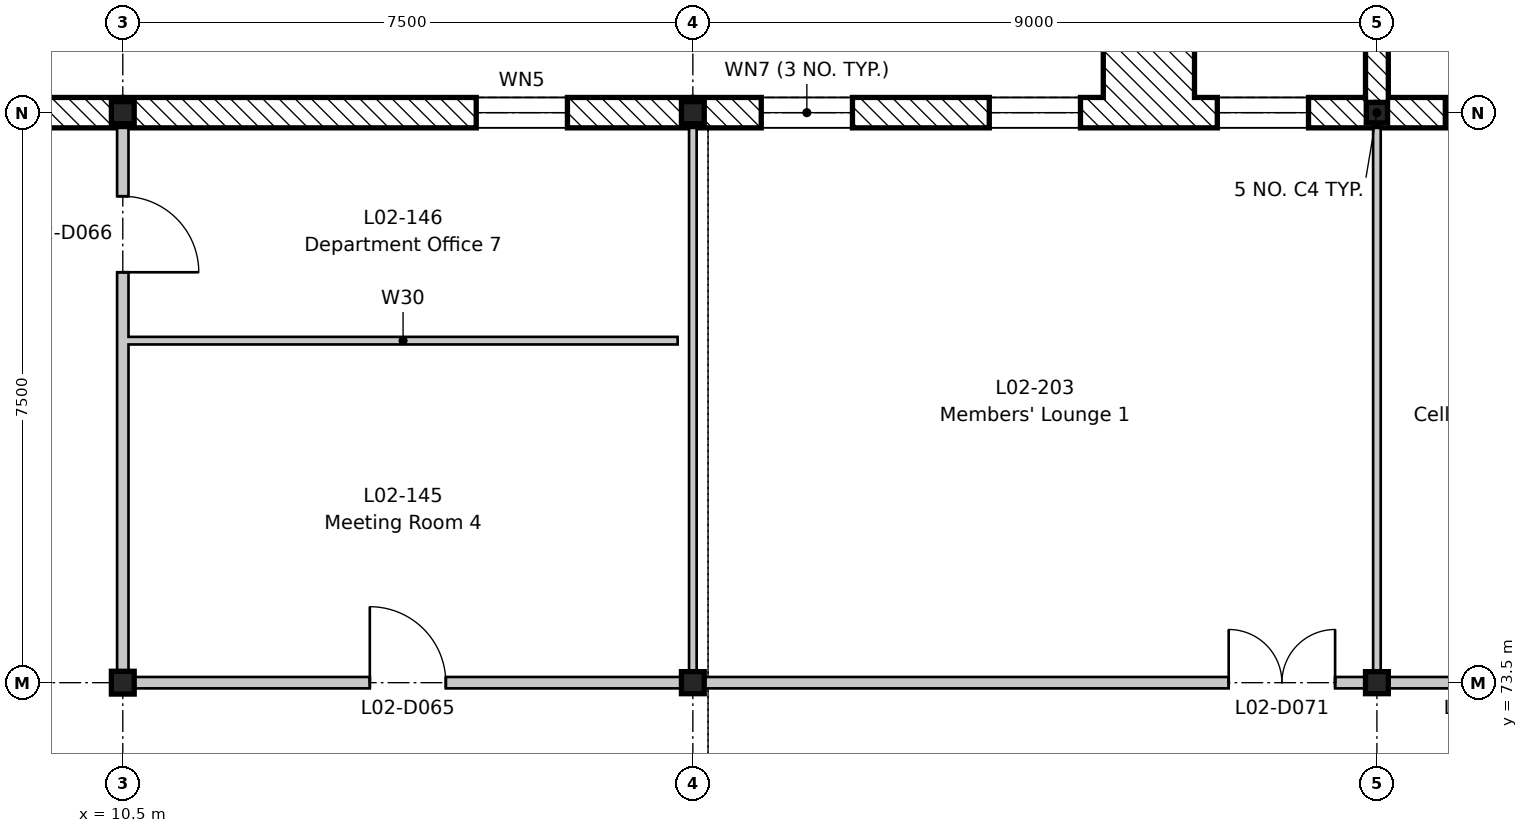
"""IFC4 building model, lengths in metres.
Left out: names, types, materials, properties, quantities, classifications, styles, units other than length and angle.
Written with IfcOpenShell. Run it as: python <this file> out.ifc"""

import sys

from ifc_helpers import new_model, si_unit, direction, frame, frame_2d, origin, origin_2d, place, context, subcontext, project, spatial, rectangle, i_section, extrude, element, fill, save


model = new_model("IFC4")
c1 = context("Model", 3, precision=1e-05, world=origin(), true_north=direction((0.0, 1.0)))
c2 = subcontext(c1, "Body", "Model", "MODEL_VIEW")
j1 = project(units=[si_unit("LENGTHUNIT", "METRE"), si_unit("PLANEANGLEUNIT", "RADIAN")], contexts=[c1])
p1 = place(None, origin())
s1 = spatial("IfcSite", under=j1, at=p1, CompositionType="ELEMENT")
p2 = place(p1, origin())
s2 = spatial("IfcBuilding", under=s1, at=p2, CompositionType="ELEMENT")
p3 = place(p2, frame((0.0, 0.0, 9.9)))
s3 = spatial("IfcBuildingStorey", under=s2, at=p3, CompositionType="ELEMENT", Elevation=9.9)
p4 = place(p3, frame((10.5, 73.5, -0.2), z_axis=(0.0, 0.0, 1.0), x_axis=(1.0, 0.0, 0.0)))
e1 = element("IfcColumn", 1, at=p4, inside=s3, PredefinedType="COLUMN", context=c2, shape_type="SweptSolid", body=[
    extrude(i_section(OverallWidth=0.3, OverallDepth=0.3, WebThickness=0.011, FlangeThickness=0.019, FilletRadius=0.027, at=origin_2d()), origin(), (0.0, 0.0, 1.0), 4.5),
])
for number, where, z_axis, x_axis in (
    (2, (10.5, 81.0, -0.2), (0.0, 0.0, 1.0), (1.0, 0.0, 0.0)),
    (3, (18.0, 73.5, -0.2), (0.0, 0.0, 1.0), (1.0, 0.0, 0.0)),
    (4, (18.0, 81.0, -0.2), (0.0, 0.0, 1.0), (1.0, 0.0, 0.0)),
    (5, (27.0, 73.5, -0.2), (0.0, 0.0, 1.0), (1.0, 0.0, 0.0)),
):
    element("IfcColumn", number, at=place(p3, frame(where, z_axis=z_axis, x_axis=x_axis)), inside=s3, PredefinedType="COLUMN", context=c2, shape_type="SweptSolid", body=[
        extrude(i_section(OverallWidth=0.3, OverallDepth=0.29, WebThickness=0.009, FlangeThickness=0.014, FilletRadius=0.027, at=origin_2d()), origin(), (0.0, 0.0, 1.0), 4.5),
    ])
p5 = place(p3, frame((27.0, 81.0, -0.2), z_axis=(0.0, 0.0, 1.0), x_axis=(1.0, 0.0, 0.0)))
e6 = element("IfcColumn", 6, at=p5, inside=s3, PredefinedType="COLUMN", context=c2, shape_type="SweptSolid", body=[
    extrude(i_section(OverallWidth=0.28, OverallDepth=0.27, WebThickness=0.008, FlangeThickness=0.013, FilletRadius=0.024, at=origin_2d()), origin(), (0.0, 0.0, 1.0), 4.5),
])
p6 = place(p3, frame((7.509, 81.0, 0.0), z_axis=(0.0, 0.0, 1.0), x_axis=(1.0, 0.0, 0.0)))
e7 = element("IfcWall", 7, at=p6, inside=s3, PredefinedType="STANDARD", context=c2, shape_type="SweptSolid", body=[
    extrude(rectangle(XDim=2.981, YDim=0.4, at=frame_2d((1.491, 0.0))), origin(), (0.0, 0.0, 1.0), 4.1),
])
p7 = place(p3, frame((10.509, 81.0, 0.0), z_axis=(0.0, 0.0, 1.0), x_axis=(1.0, 0.0, 0.0)))
e8 = element("IfcWall", 8, at=p7, inside=s3, PredefinedType="STANDARD", context=c2, shape_type="SweptSolid", body=[
    extrude(rectangle(XDim=7.481, YDim=0.4, at=frame_2d((3.741, 0.0))), origin(), (0.0, 0.0, 1.0), 3.97),
])
p8 = place(p7, frame((4.641, 0.0, 0.6)))
e9 = element("IfcOpeningElement", 9, at=p8, cuts=e8, PredefinedType="OPENING", context=c2, shape_type="SweptSolid", body=[
    extrude(rectangle(XDim=1.2, YDim=3.0, at=frame_2d((0.6, 1.5))), frame((0.0, 0.21, 0.0), z_axis=(0.0, -1.0, 0.0), x_axis=(1.0, 0.0, 0.0)), (0.0, 0.0, 1.0), 0.42),
])
p9 = place(p3, frame((18.009, 81.0, 0.0), z_axis=(0.0, 0.0, 1.0), x_axis=(1.0, 0.0, 0.0)))
e10 = element("IfcWall", 10, at=p9, inside=s3, PredefinedType="STANDARD", context=c2, shape_type="SweptSolid", body=[
    extrude(rectangle(XDim=8.982, YDim=0.4, at=frame_2d((4.491, 0.0))), origin(), (0.0, 0.0, 1.0), 3.9),
])
p10 = place(p9, frame((0.891, 0.0, 0.9)))
e11 = element("IfcOpeningElement", 11, at=p10, cuts=e10, PredefinedType="OPENING", context=c2, shape_type="SweptSolid", body=[
    extrude(rectangle(XDim=1.2, YDim=2.4, at=frame_2d((0.6, 1.2))), frame((0.0, 0.21, 0.0), z_axis=(0.0, -1.0, 0.0), x_axis=(1.0, 0.0, 0.0)), (0.0, 0.0, 1.0), 0.42),
])
p11 = place(p9, frame((3.891, 0.0, 0.9)))
e12 = element("IfcOpeningElement", 12, at=p11, cuts=e10, PredefinedType="OPENING", context=c2, shape_type="SweptSolid", body=[
    extrude(rectangle(XDim=1.2, YDim=2.4, at=frame_2d((0.6, 1.2))), frame((0.0, 0.21, 0.0), z_axis=(0.0, -1.0, 0.0), x_axis=(1.0, 0.0, 0.0)), (0.0, 0.0, 1.0), 0.42),
])
p12 = place(p9, frame((6.891, 0.0, 0.9)))
e13 = element("IfcOpeningElement", 13, at=p12, cuts=e10, PredefinedType="OPENING", context=c2, shape_type="SweptSolid", body=[
    extrude(rectangle(XDim=1.2, YDim=2.4, at=frame_2d((0.6, 1.2))), frame((0.0, 0.21, 0.0), z_axis=(0.0, -1.0, 0.0), x_axis=(1.0, 0.0, 0.0)), (0.0, 0.0, 1.0), 0.42),
])
p13 = place(p3, frame((27.009, 81.0, 0.0), z_axis=(0.0, 0.0, 1.0), x_axis=(1.0, 0.0, 0.0)))
e14 = element("IfcWall", 14, at=p13, inside=s3, PredefinedType="STANDARD", context=c2, shape_type="SweptSolid", body=[
    extrude(rectangle(XDim=8.982, YDim=0.4, at=frame_2d((4.491, 0.0))), origin(), (0.0, 0.0, 1.0), 3.9),
])
p14 = place(p13, frame((6.591, 0.0, 0.0)))
e15 = element("IfcOpeningElement", 15, at=p14, cuts=e14, PredefinedType="OPENING", context=c2, shape_type="SweptSolid", body=[
    extrude(rectangle(XDim=1.8, YDim=2.4, at=frame_2d((0.9, 1.2))), frame((0.0, 0.21, 0.0), z_axis=(0.0, -1.0, 0.0), x_axis=(1.0, 0.0, 0.0)), (0.0, 0.0, 1.0), 0.42),
])
p15 = place(p13, frame((0.891, 0.0, 0.9)))
e16 = element("IfcOpeningElement", 16, at=p15, cuts=e14, PredefinedType="OPENING", context=c2, shape_type="SweptSolid", body=[
    extrude(rectangle(XDim=1.2, YDim=2.4, at=frame_2d((0.6, 1.2))), frame((0.0, 0.21, 0.0), z_axis=(0.0, -1.0, 0.0), x_axis=(1.0, 0.0, 0.0)), (0.0, 0.0, 1.0), 0.42),
])
p16 = place(p13, frame((3.891, 0.0, 0.9)))
e17 = element("IfcOpeningElement", 17, at=p16, cuts=e14, PredefinedType="OPENING", context=c2, shape_type="SweptSolid", body=[
    extrude(rectangle(XDim=1.2, YDim=2.4, at=frame_2d((0.6, 1.2))), frame((0.0, 0.21, 0.0), z_axis=(0.0, -1.0, 0.0), x_axis=(1.0, 0.0, 0.0)), (0.0, 0.0, 1.0), 0.42),
])
p17 = place(p3, frame((23.4, 81.8, 0.0), z_axis=(0.0, 0.0, 1.0), x_axis=(1.0, 0.0, 0.0)))
e18 = element("IfcWall", 18, at=p17, inside=s3, PredefinedType="STANDARD", context=c2, shape_type="SweptSolid", body=[
    extrude(rectangle(XDim=1.2, YDim=1.2, at=frame_2d((0.6, 0.0))), origin(), (0.0, 0.0, 1.0), 4.5),
])
p18 = place(p3, frame((27.0, 81.135, 0.0), z_axis=(0.0, 0.0, 1.0), x_axis=(0.0, 1.0, 0.0)))
e19 = element("IfcWall", 19, at=p18, inside=s3, PredefinedType="STANDARD", context=c2, shape_type="SweptSolid", body=[
    extrude(rectangle(XDim=2.865, YDim=0.3, at=frame_2d((1.433, 0.0))), origin(), (0.0, 0.0, 1.0), 3.97),
])
p19 = place(p3, frame((10.5, 73.5, 0.0), z_axis=(0.0, 0.0, 1.0), x_axis=(0.0, 1.0, 0.0)))
e20 = element("IfcWall", 20, at=p19, inside=s3, PredefinedType="PARTITIONING", context=c2, shape_type="SweptSolid", body=[
    extrude(rectangle(XDim=7.3, YDim=0.15, at=frame_2d((3.65, 0.0))), origin(), (0.0, 0.0, 1.0), 3.78),
])
p20 = place(p19, frame((5.4, 0.0, 0.0)))
e21 = element("IfcOpeningElement", 21, at=p20, cuts=e20, PredefinedType="OPENING", context=c2, shape_type="SweptSolid", body=[
    extrude(rectangle(XDim=1.0, YDim=2.1, at=frame_2d((0.5, 1.05))), frame((0.0, 0.085, 0.0), z_axis=(0.0, -1.0, 0.0), x_axis=(1.0, 0.0, 0.0)), (0.0, 0.0, 1.0), 0.17),
])
p21 = place(p3, frame((10.575, 73.5, 0.0), z_axis=(0.0, 0.0, 1.0), x_axis=(1.0, 0.0, 0.0)))
e22 = element("IfcWall", 22, at=p21, inside=s3, PredefinedType="PARTITIONING", context=c2, shape_type="SweptSolid", body=[
    extrude(rectangle(XDim=7.425, YDim=0.15, at=frame_2d((3.712, 0.0))), origin(), (0.0, 0.0, 1.0), 3.95),
])
p22 = place(p21, frame((3.175, 0.0, 0.0)))
e23 = element("IfcOpeningElement", 23, at=p22, cuts=e22, PredefinedType="OPENING", context=c2, shape_type="SweptSolid", body=[
    extrude(rectangle(XDim=1.0, YDim=2.1, at=frame_2d((0.5, 1.05))), frame((0.0, 0.085, 0.0), z_axis=(0.0, -1.0, 0.0), x_axis=(1.0, 0.0, 0.0)), (0.0, 0.0, 1.0), 0.17),
])
p23 = place(p3, frame((10.575, 78.0, 0.0), z_axis=(0.0, 0.0, 1.0), x_axis=(1.0, 0.0, 0.0)))
e24 = element("IfcWall", 24, at=p23, inside=s3, PredefinedType="PARTITIONING", context=c2, shape_type="SweptSolid", body=[
    extrude(rectangle(XDim=7.225, YDim=0.1, at=frame_2d((3.613, 0.0))), origin(), (0.0, 0.0, 1.0), 4.3),
])
p24 = place(p3, frame((18.0, 73.575, 0.0), z_axis=(0.0, 0.0, 1.0), x_axis=(0.0, 1.0, 0.0)))
e25 = element("IfcWall", 25, at=p24, inside=s3, PredefinedType="PARTITIONING", context=c2, shape_type="SweptSolid", body=[
    extrude(rectangle(XDim=7.225, YDim=0.1, at=frame_2d((3.613, 0.0))), origin(), (0.0, 0.0, 1.0), 3.88),
])
p25 = place(p3, frame((27.0, 73.575, 0.0), z_axis=(0.0, 0.0, 1.0), x_axis=(0.0, 1.0, 0.0)))
e26 = element("IfcWall", 26, at=p25, inside=s3, PredefinedType="PARTITIONING", context=c2, shape_type="SweptSolid", body=[
    extrude(rectangle(XDim=7.225, YDim=0.1, at=frame_2d((3.613, 0.0))), origin(), (0.0, 0.0, 1.0), 3.95),
])
p26 = place(p3, frame((18.0, 73.5, 0.0), z_axis=(0.0, 0.0, 1.0), x_axis=(1.0, 0.0, 0.0)))
e27 = element("IfcWall", 27, at=p26, inside=s3, PredefinedType="PARTITIONING", context=c2, shape_type="SweptSolid", body=[
    extrude(rectangle(XDim=35.8, YDim=0.15, at=frame_2d((17.9, 0.0))), origin(), (0.0, 0.0, 1.0), 3.78),
])
p27 = place(p26, frame((7.05, 0.0, 0.0)))
e28 = element("IfcOpeningElement", 28, at=p27, cuts=e27, PredefinedType="OPENING", context=c2, shape_type="SweptSolid", body=[
    extrude(rectangle(XDim=1.4, YDim=2.1, at=frame_2d((0.7, 1.05))), frame((0.0, 0.085, 0.0), z_axis=(0.0, -1.0, 0.0), x_axis=(1.0, 0.0, 0.0)), (0.0, 0.0, 1.0), 0.17),
])
p28 = place(p26, frame((10.0, 0.0, 0.0)))
e29 = element("IfcOpeningElement", 29, at=p28, cuts=e27, PredefinedType="OPENING", context=c2, shape_type="SweptSolid", body=[
    extrude(rectangle(XDim=1.0, YDim=2.1, at=frame_2d((0.5, 1.05))), frame((0.0, 0.085, 0.0), z_axis=(0.0, -1.0, 0.0), x_axis=(1.0, 0.0, 0.0)), (0.0, 0.0, 1.0), 0.17),
])
p29 = place(p26, frame((14.5, 0.0, 0.0)))
e30 = element("IfcOpeningElement", 30, at=p29, cuts=e27, PredefinedType="OPENING", context=c2, shape_type="SweptSolid", body=[
    extrude(rectangle(XDim=1.0, YDim=2.1, at=frame_2d((0.5, 1.05))), frame((0.0, 0.085, 0.0), z_axis=(0.0, -1.0, 0.0), x_axis=(1.0, 0.0, 0.0)), (0.0, 0.0, 1.0), 0.17),
])
p30 = place(p26, frame((20.5, 0.0, 0.0)))
e31 = element("IfcOpeningElement", 31, at=p30, cuts=e27, PredefinedType="OPENING", context=c2, shape_type="SweptSolid", body=[
    extrude(rectangle(XDim=1.0, YDim=2.1, at=frame_2d((0.5, 1.05))), frame((0.0, 0.085, 0.0), z_axis=(0.0, -1.0, 0.0), x_axis=(1.0, 0.0, 0.0)), (0.0, 0.0, 1.0), 0.17),
])
p31 = place(p26, frame((25.0, 0.0, 0.0)))
e32 = element("IfcOpeningElement", 32, at=p31, cuts=e27, PredefinedType="OPENING", context=c2, shape_type="SweptSolid", body=[
    extrude(rectangle(XDim=1.0, YDim=2.1, at=frame_2d((0.5, 1.05))), frame((0.0, 0.085, 0.0), z_axis=(0.0, -1.0, 0.0), x_axis=(1.0, 0.0, 0.0)), (0.0, 0.0, 1.0), 0.17),
])
p32 = place(p26, frame((30.8, 0.0, 0.0)))
e33 = element("IfcOpeningElement", 33, at=p32, cuts=e27, PredefinedType="OPENING", context=c2, shape_type="SweptSolid", body=[
    extrude(rectangle(XDim=1.4, YDim=2.1, at=frame_2d((0.7, 1.05))), frame((0.0, 0.085, 0.0), z_axis=(0.0, -1.0, 0.0), x_axis=(1.0, 0.0, 0.0)), (0.0, 0.0, 1.0), 0.17),
])
p33 = place(p8, origin())
e34 = element("IfcWindow", 34, at=p33, inside=s3, PartitioningType="SINGLE_PANEL", PredefinedType="WINDOW", context=c2, shape_type="SweptSolid", body=[
    extrude(rectangle(XDim=1.2, YDim=3.0, at=frame_2d((0.6, 1.5))), frame((0.0, 0.03, 0.0), z_axis=(0.0, -1.0, 0.0), x_axis=(1.0, 0.0, 0.0)), (0.0, 0.0, 1.0), 0.06),
])
fill(e9, e34)
p34 = place(p10, origin())
e35 = element("IfcWindow", 35, at=p34, inside=s3, PartitioningType="SINGLE_PANEL", PredefinedType="WINDOW", context=c2, shape_type="SweptSolid", body=[
    extrude(rectangle(XDim=1.2, YDim=2.4, at=frame_2d((0.6, 1.2))), frame((0.0, -0.12, 0.0), z_axis=(0.0, -1.0, 0.0), x_axis=(1.0, 0.0, 0.0)), (0.0, 0.0, 1.0), 0.06),
])
fill(e11, e35)
p35 = place(p11, origin())
e36 = element("IfcWindow", 36, at=p35, inside=s3, PartitioningType="SINGLE_PANEL", PredefinedType="WINDOW", context=c2, shape_type="SweptSolid", body=[
    extrude(rectangle(XDim=1.2, YDim=2.4, at=frame_2d((0.6, 1.2))), frame((0.0, -0.12, 0.0), z_axis=(0.0, -1.0, 0.0), x_axis=(1.0, 0.0, 0.0)), (0.0, 0.0, 1.0), 0.06),
])
fill(e12, e36)
p36 = place(p12, origin())
e37 = element("IfcWindow", 37, at=p36, inside=s3, PartitioningType="SINGLE_PANEL", PredefinedType="WINDOW", context=c2, shape_type="SweptSolid", body=[
    extrude(rectangle(XDim=1.2, YDim=2.4, at=frame_2d((0.6, 1.2))), frame((0.0, -0.12, 0.0), z_axis=(0.0, -1.0, 0.0), x_axis=(1.0, 0.0, 0.0)), (0.0, 0.0, 1.0), 0.06),
])
fill(e13, e37)
p37 = place(p15, origin())
e38 = element("IfcWindow", 38, at=p37, inside=s3, PartitioningType="SINGLE_PANEL", PredefinedType="WINDOW", context=c2, shape_type="SweptSolid", body=[
    extrude(rectangle(XDim=1.2, YDim=2.4, at=frame_2d((0.6, 1.2))), frame((0.0, -0.12, 0.0), z_axis=(0.0, -1.0, 0.0), x_axis=(1.0, 0.0, 0.0)), (0.0, 0.0, 1.0), 0.06),
])
fill(e16, e38)
p38 = place(p22, origin())
e39 = element("IfcDoor", 39, at=p38, inside=s3, OperationType="SINGLE_SWING_LEFT", PredefinedType="DOOR", context=c2, shape_type="SweptSolid", body=[
    extrude(rectangle(XDim=1.0, YDim=2.1, at=frame_2d((0.5, 1.05))), frame((0.0, 0.025, 0.0), z_axis=(0.0, -1.0, 0.0), x_axis=(1.0, 0.0, 0.0)), (0.0, 0.0, 1.0), 0.05),
])
fill(e23, e39)
p39 = place(p20, frame((1.0, 0.0, 0.0), z_axis=(0.0, 0.0, 1.0), x_axis=(-1.0, 0.0, 0.0)))
e40 = element("IfcDoor", 40, at=p39, inside=s3, OperationType="SINGLE_SWING_RIGHT", PredefinedType="DOOR", context=c2, shape_type="SweptSolid", body=[
    extrude(rectangle(XDim=1.0, YDim=2.1, at=frame_2d((0.5, 1.05))), frame((0.0, 0.025, 0.0), z_axis=(0.0, -1.0, 0.0), x_axis=(1.0, 0.0, 0.0)), (0.0, 0.0, 1.0), 0.05),
])
fill(e21, e40)
p40 = place(p27, origin())
e41 = element("IfcDoor", 41, at=p40, inside=s3, OperationType="DOUBLE_DOOR_SINGLE_SWING", PredefinedType="DOOR", context=c2, shape_type="SweptSolid", body=[
    extrude(rectangle(XDim=1.4, YDim=2.1, at=frame_2d((0.7, 1.05))), frame((0.0, 0.025, 0.0), z_axis=(0.0, -1.0, 0.0), x_axis=(1.0, 0.0, 0.0)), (0.0, 0.0, 1.0), 0.05),
])
fill(e28, e41)
save(model, sys.argv[1])
